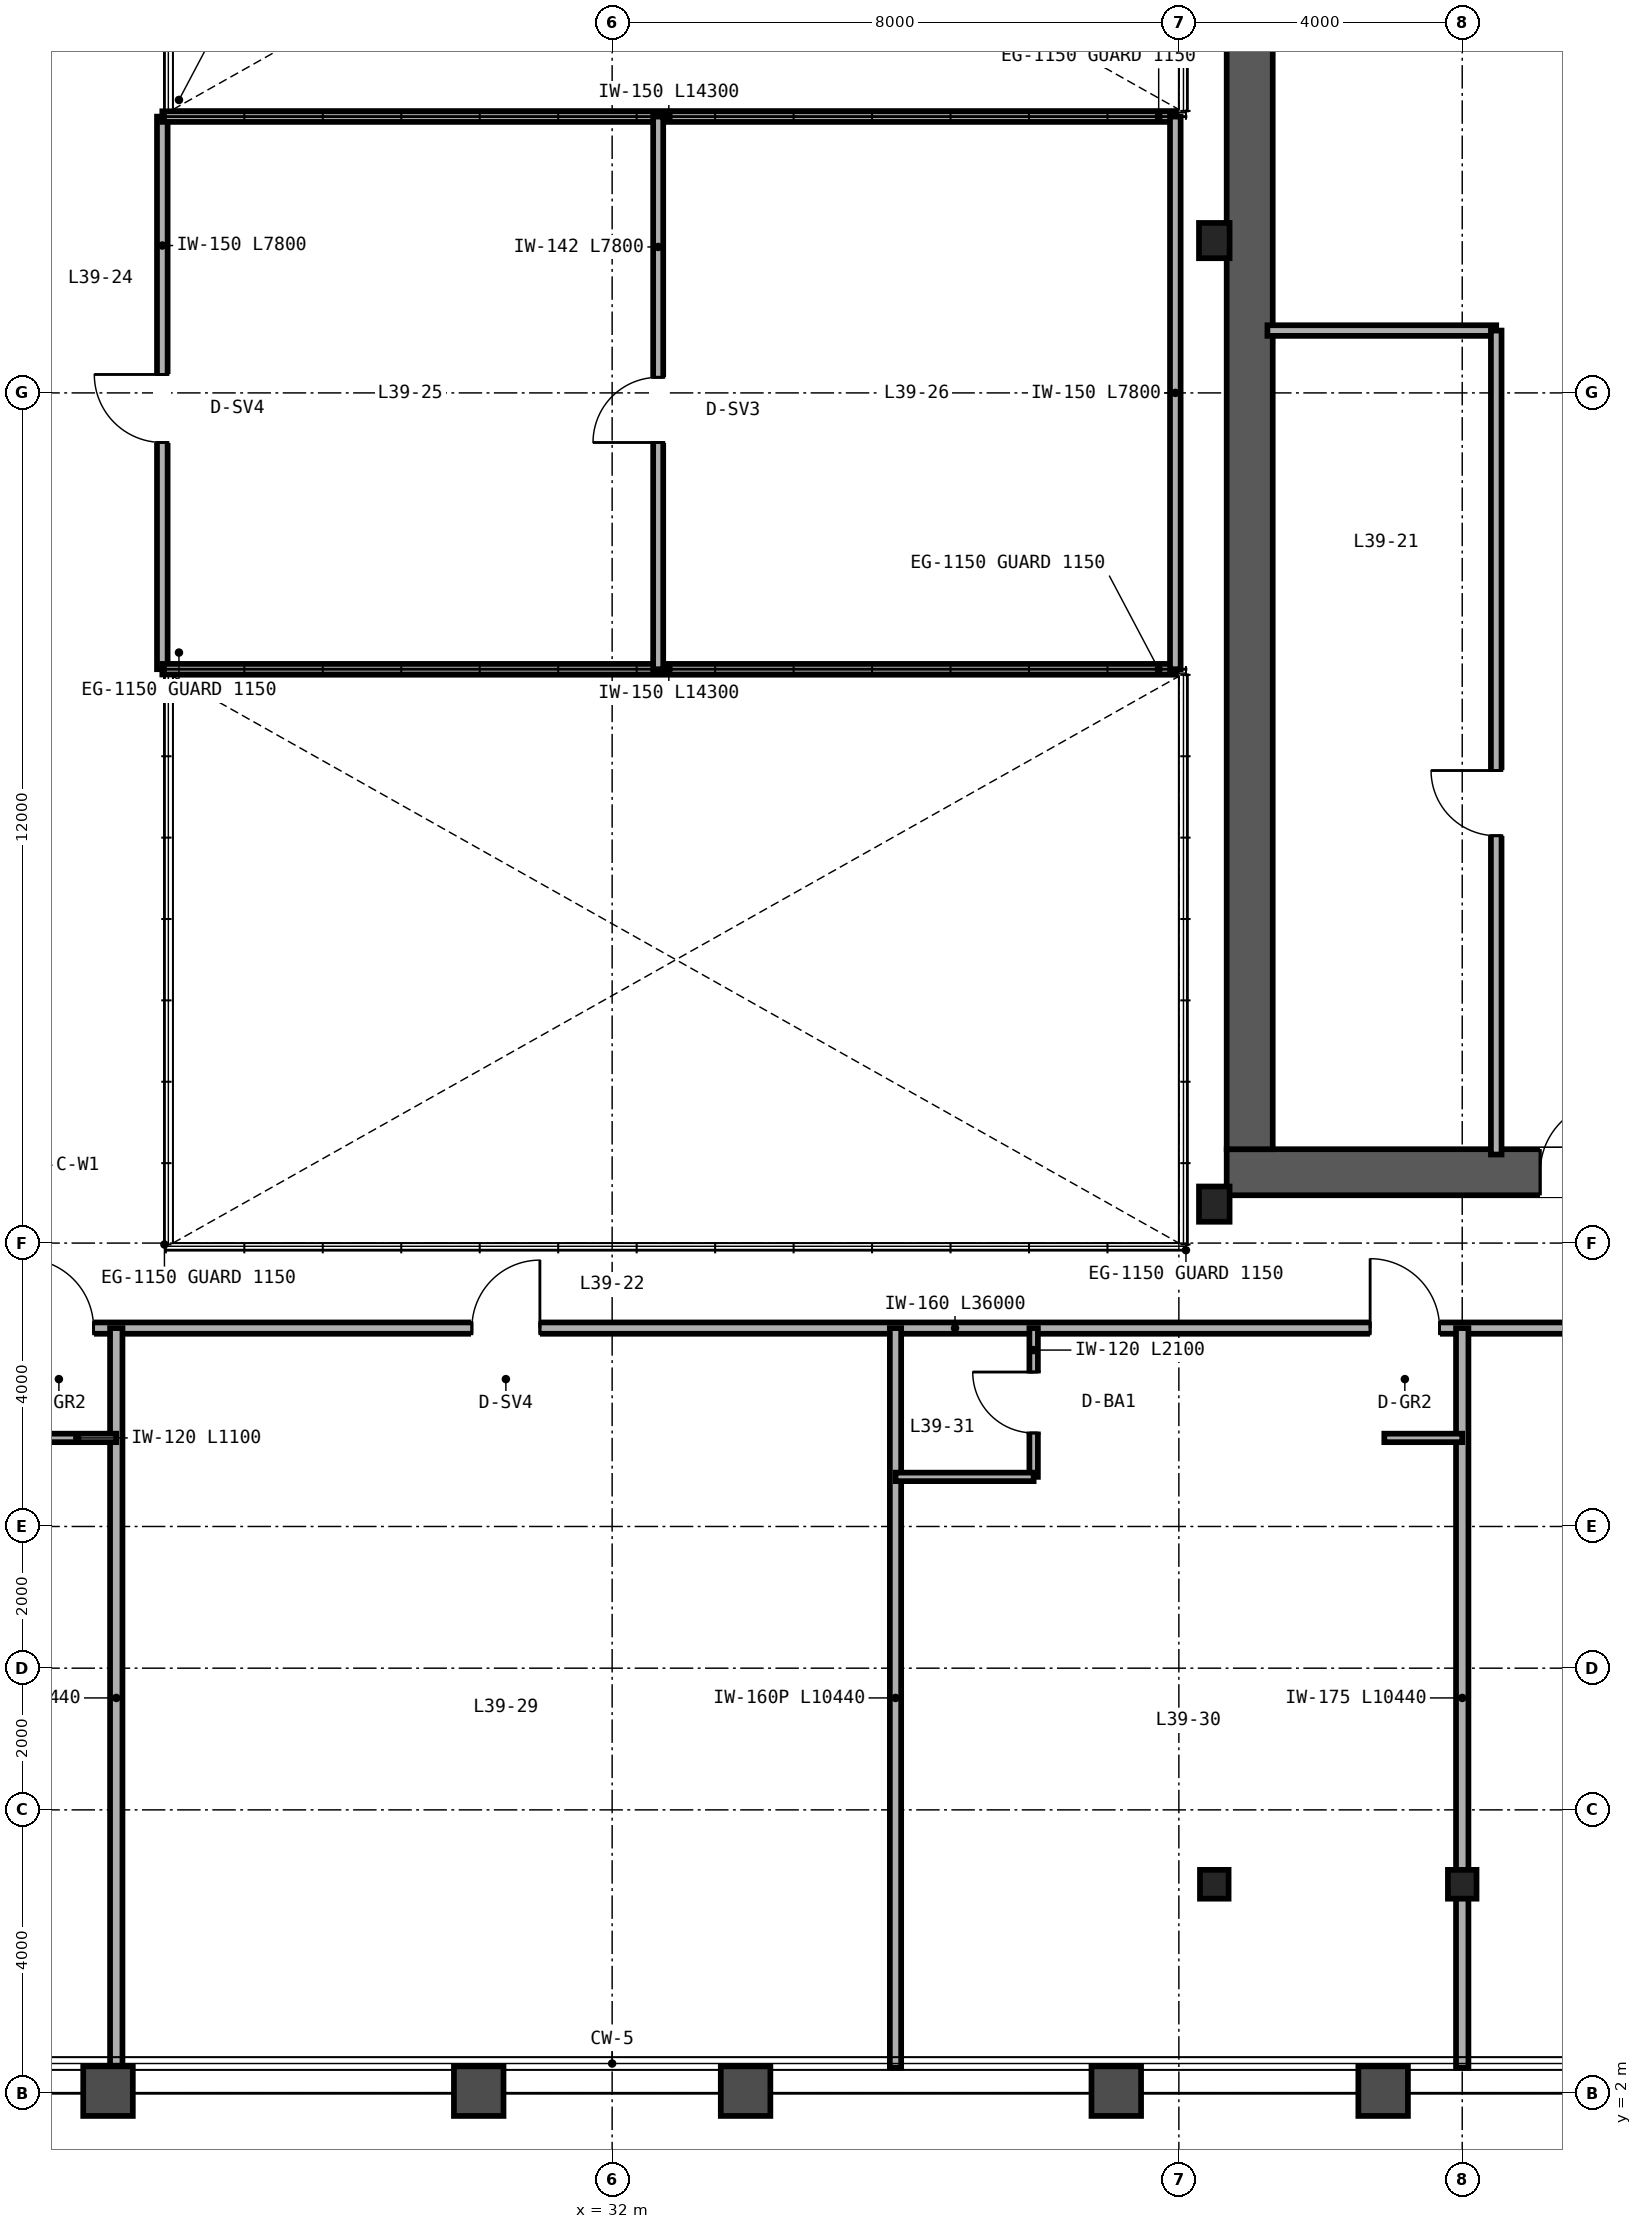
"""IFC4 building model, lengths in metres.
Left out: names, types, materials, properties, quantities, classifications, styles, units other than length and angle.
Written with IfcOpenShell. Run it as: python <this file> out.ifc"""

import sys

from ifc_helpers import new_model, si_unit, direction, frame, frame_2d, origin, origin_2d, place, context, subcontext, project, spatial, rectangle, i_section, extrude, source, transform, mapped, element, fill, save


model = new_model("IFC4")
c1 = context("Model", 3, precision=1e-05, world=origin(), true_north=direction((0.0, 1.0)))
c2 = subcontext(c1, "Body", "Model", "MODEL_VIEW")
j1 = project(units=[si_unit("LENGTHUNIT", "METRE"), si_unit("PLANEANGLEUNIT", "RADIAN")], contexts=[c1])
p1 = place(None, origin())
s1 = spatial("IfcSite", under=j1, at=p1, CompositionType="ELEMENT")
p2 = place(p1, origin())
s2 = spatial("IfcBuilding", under=s1, at=p2, CompositionType="ELEMENT")
p3 = place(p2, frame((0.0, 0.0, 158.4)))
s3 = spatial("IfcBuildingStorey", under=s2, at=p3, CompositionType="ELEMENT", Elevation=158.4)
p4 = place(p3, frame((40.675, 15.0, 0.0), z_axis=(0.0, 0.0, 1.0), x_axis=(1.0, 0.0, 0.0)))
e1 = element("IfcWall", 1, at=p4, inside=s3, PredefinedType="SHEAR", context=c2, shape_type="SweptSolid", body=[
    extrude(rectangle(XDim=12.65, YDim=0.65, at=frame_2d((6.325, 0.0))), origin(), (0.0, 0.0, 1.0), 4.57),
])
p5 = place(p4, frame((4.425, 0.0, 0.0)))
e2 = element("IfcOpeningElement", 2, at=p5, cuts=e1, PredefinedType="OPENING", context=c2, shape_type="SweptSolid", body=[
    extrude(rectangle(XDim=1.0, YDim=2.15, at=frame_2d((0.5, 1.075))), frame((0.0, 0.335, 0.0), z_axis=(0.0, -1.0, 0.0), x_axis=(1.0, 0.0, 0.0)), (0.0, 0.0, 1.0), 0.67),
])
p6 = place(p3, frame((41.0, 15.325, 0.0), z_axis=(0.0, 0.0, 1.0), x_axis=(0.0, 1.0, 0.0)))
e3 = element("IfcWall", 3, at=p6, inside=s3, PredefinedType="SHEAR", context=c2, shape_type="SweptSolid", body=[
    extrude(rectangle(XDim=21.35, YDim=0.65, at=frame_2d((10.675, 0.0))), origin(), (0.0, 0.0, 1.0), 4.57),
])
m1 = source(origin(), c2, "Body", "SweptSolid", [
    extrude(i_section(OverallWidth=0.432, OverallDepth=0.498, WebThickness=0.056, FlangeThickness=0.089, FilletRadius=0.025, at=origin_2d()), origin(), (0.0, 0.0, 1.0), 4.57),
])
for number, where, z_axis, x_axis in (
    (4, (40.5, 14.55, 0.0), (0.0, 0.0, 1.0), (1.0, 0.0, 0.0)),
    (5, (40.5, 28.15, 0.0), (0.0, 0.0, 1.0), (1.0, 0.0, 0.0)),
):
    element("IfcColumn", number, at=place(p3, frame(where, z_axis=z_axis, x_axis=x_axis)), inside=s3, PredefinedType="COLUMN", context=c2, shape_type="MappedRepresentation", body=[
        mapped(m1, transform((0.0, 0.0, 0.0), scale=1.0)),
    ])
m2 = source(origin(), c2, "Body", "SweptSolid", [
    extrude(i_section(OverallWidth=0.404, OverallDepth=0.407, WebThickness=0.027, FlangeThickness=0.044, FilletRadius=0.025, at=origin_2d()), origin(), (0.0, 0.0, 1.0), 4.989),
])
for number, where, z_axis, x_axis in (
    (6, (40.5, 4.95, 0.0), (0.0, 0.401, 0.916), (-1.0, 0.0, 0.0)),
    (7, (44.0, 4.95, 0.0), (0.0, 0.401, 0.916), (-1.0, 0.0, 0.0)),
):
    element("IfcColumn", number, at=place(p3, frame(where, z_axis=z_axis, x_axis=x_axis)), inside=s3, PredefinedType="COLUMN", context=c2, shape_type="MappedRepresentation", body=[
        mapped(m2, transform((0.0, 0.0, 0.0), scale=1.0)),
    ])
p7 = place(p3, frame((41.25, 26.88, 0.0), z_axis=(0.0, 0.0, 1.0), x_axis=(1.0, 0.0, 0.0)))
e8 = element("IfcWall", 8, at=p7, inside=s3, PredefinedType="PARTITIONING", context=c2, shape_type="SweptSolid", body=[
    extrude(rectangle(XDim=3.23, YDim=0.15, at=frame_2d((1.615, 0.0))), origin(), (0.0, 0.0, 1.0), 4.57),
])
p8 = place(p3, frame((44.48, 15.25, 0.0), z_axis=(0.0, 0.0, 1.0), x_axis=(0.0, 1.0, 0.0)))
e9 = element("IfcWall", 9, at=p8, inside=s3, PredefinedType="PARTITIONING", context=c2, shape_type="SweptSolid", body=[
    extrude(rectangle(XDim=11.63, YDim=0.15, at=frame_2d((5.815, 0.0))), origin(), (0.0, 0.0, 1.0), 4.57),
])
p9 = place(p8, frame((4.5, 0.0, 0.0)))
e10 = element("IfcOpeningElement", 10, at=p9, cuts=e9, PredefinedType="OPENING", context=c2, shape_type="SweptSolid", body=[
    extrude(rectangle(XDim=0.92, YDim=2.15, at=frame_2d((0.46, 1.075))), frame((0.0, 0.085, 0.0), z_axis=(0.0, -1.0, 0.0), x_axis=(1.0, 0.0, 0.0)), (0.0, 0.0, 1.0), 0.17),
])
p10 = place(p3, frame((25.65, 22.1, 0.0), z_axis=(0.0, 0.0, 1.0), x_axis=(0.0, 1.0, 0.0)))
e11 = element("IfcWall", 11, at=p10, inside=s3, PredefinedType="PARTITIONING", context=c2, shape_type="SweptSolid", body=[
    extrude(rectangle(XDim=7.8, YDim=0.15, at=frame_2d((3.9, 0.0))), origin(), (0.0, 0.0, 1.0), 3.643),
])
p11 = place(p10, frame((3.2, 0.0, 0.0)))
e12 = element("IfcOpeningElement", 12, at=p11, cuts=e11, PredefinedType="OPENING", context=c2, shape_type="SweptSolid", body=[
    extrude(rectangle(XDim=0.96, YDim=2.15, at=frame_2d((0.48, 1.075))), frame((0.0, 0.085, 0.0), z_axis=(0.0, -1.0, 0.0), x_axis=(1.0, 0.0, 0.0)), (0.0, 0.0, 1.0), 0.17),
])
for number, where, z_axis, x_axis in (
    (13, (25.65, 22.1, 0.0), (0.0, 0.0, 1.0), (1.0, 0.0, 0.0)),
    (14, (25.65, 29.9, 0.0), (0.0, 0.0, 1.0), (1.0, 0.0, 0.0)),
):
    element("IfcWall", number, at=place(p3, frame(where, z_axis=z_axis, x_axis=x_axis)), inside=s3, PredefinedType="PARTITIONING", context=c2, shape_type="SweptSolid", body=[
        extrude(rectangle(XDim=14.3, YDim=0.15, at=frame_2d((7.15, 0.0))), origin(), (0.0, 0.0, 1.0), 4.57),
    ])
p12 = place(p3, frame((39.95, 22.1, 0.0), z_axis=(0.0, 0.0, 1.0), x_axis=(0.0, 1.0, 0.0)))
e15 = element("IfcWall", 15, at=p12, inside=s3, PredefinedType="PARTITIONING", context=c2, shape_type="SweptSolid", body=[
    extrude(rectangle(XDim=7.8, YDim=0.15, at=frame_2d((3.9, 0.0))), origin(), (0.0, 0.0, 1.0), 3.643),
])
p13 = place(p3, frame((32.65, 22.1, 0.0), z_axis=(0.0, 0.0, 1.0), x_axis=(0.0, 1.0, 0.0)))
e16 = element("IfcWall", 16, at=p13, inside=s3, PredefinedType="PARTITIONING", context=c2, shape_type="SweptSolid", body=[
    extrude(rectangle(XDim=7.8, YDim=0.142, at=frame_2d((3.9, 0.0))), origin(), (0.0, 0.0, 1.0), 3.643),
])
p14 = place(p13, frame((3.2, 0.0, 0.0)))
e17 = element("IfcOpeningElement", 17, at=p14, cuts=e16, PredefinedType="OPENING", context=c2, shape_type="SweptSolid", body=[
    extrude(rectangle(XDim=0.92, YDim=2.15, at=frame_2d((0.46, 1.075))), frame((0.0, 0.081, 0.0), z_axis=(0.0, -1.0, 0.0), x_axis=(1.0, 0.0, 0.0)), (0.0, 0.0, 1.0), 0.162),
])
p15 = place(p3, frame((14.0, 12.8, 0.0), z_axis=(0.0, 0.0, 1.0), x_axis=(1.0, 0.0, 0.0)))
e18 = element("IfcWall", 18, at=p15, inside=s3, PredefinedType="PARTITIONING", context=c2, shape_type="SweptSolid", body=[
    extrude(rectangle(XDim=36.0, YDim=0.16, at=frame_2d((18.0, 0.0))), origin(), (0.0, 0.0, 1.0), 4.113),
])
p16 = place(p15, frame((9.7, 0.0, 0.0)))
e19 = element("IfcOpeningElement", 19, at=p16, cuts=e18, PredefinedType="OPENING", context=c2, shape_type="SweptSolid", body=[
    extrude(rectangle(XDim=0.98, YDim=2.2, at=frame_2d((0.49, 1.1))), frame((0.0, 0.09, 0.0), z_axis=(0.0, -1.0, 0.0), x_axis=(1.0, 0.0, 0.0)), (0.0, 0.0, 1.0), 0.18),
])
p17 = place(p15, frame((16.02, 0.0, 0.0)))
e20 = element("IfcOpeningElement", 20, at=p17, cuts=e18, PredefinedType="OPENING", context=c2, shape_type="SweptSolid", body=[
    extrude(rectangle(XDim=0.96, YDim=2.15, at=frame_2d((0.48, 1.075))), frame((0.0, 0.09, 0.0), z_axis=(0.0, -1.0, 0.0), x_axis=(1.0, 0.0, 0.0)), (0.0, 0.0, 1.0), 0.18),
])
p18 = place(p15, frame((28.7, 0.0, 0.0)))
e21 = element("IfcOpeningElement", 21, at=p18, cuts=e18, PredefinedType="OPENING", context=c2, shape_type="SweptSolid", body=[
    extrude(rectangle(XDim=0.98, YDim=2.2, at=frame_2d((0.49, 1.1))), frame((0.0, 0.09, 0.0), z_axis=(0.0, -1.0, 0.0), x_axis=(1.0, 0.0, 0.0)), (0.0, 0.0, 1.0), 0.18),
])
p19 = place(p15, frame((32.52, 0.0, 0.0)))
e22 = element("IfcOpeningElement", 22, at=p19, cuts=e18, PredefinedType="OPENING", context=c2, shape_type="SweptSolid", body=[
    extrude(rectangle(XDim=0.96, YDim=2.15, at=frame_2d((0.48, 1.075))), frame((0.0, 0.09, 0.0), z_axis=(0.0, -1.0, 0.0), x_axis=(1.0, 0.0, 0.0)), (0.0, 0.0, 1.0), 0.18),
])
p20 = place(p3, frame((25.0, 2.36, 0.0), z_axis=(0.0, 0.0, 1.0), x_axis=(0.0, 1.0, 0.0)))
e23 = element("IfcWall", 23, at=p20, inside=s3, PredefinedType="PARTITIONING", context=c2, shape_type="SweptSolid", body=[
    extrude(rectangle(XDim=10.44, YDim=0.175, at=frame_2d((5.22, 0.0))), origin(), (0.0, 0.0, 1.0), 3.643),
])
p21 = place(p3, frame((23.9, 11.25, 0.0), z_axis=(0.0, 0.0, 1.0), x_axis=(1.0, 0.0, 0.0)))
e24 = element("IfcWall", 24, at=p21, inside=s3, PredefinedType="PARTITIONING", context=c2, shape_type="SweptSolid", body=[
    extrude(rectangle(XDim=1.1, YDim=0.12, at=frame_2d((0.55, 0.0))), origin(), (0.0, 0.0, 1.0), 4.57),
])
p22 = place(p3, frame((36.0, 2.36, 0.0), z_axis=(0.0, 0.0, 1.0), x_axis=(0.0, 1.0, 0.0)))
e25 = element("IfcWall", 25, at=p22, inside=s3, PredefinedType="PARTITIONING", context=c2, shape_type="SweptSolid", body=[
    extrude(rectangle(XDim=10.44, YDim=0.16, at=frame_2d((5.22, 0.0))), origin(), (0.0, 0.0, 1.0), 3.643),
])
p23 = place(p3, frame((44.0, 2.36, 0.0), z_axis=(0.0, 0.0, 1.0), x_axis=(0.0, 1.0, 0.0)))
e26 = element("IfcWall", 26, at=p23, inside=s3, PredefinedType="PARTITIONING", context=c2, shape_type="SweptSolid", body=[
    extrude(rectangle(XDim=10.44, YDim=0.175, at=frame_2d((5.22, 0.0))), origin(), (0.0, 0.0, 1.0), 3.877),
])
p24 = place(p3, frame((37.95, 10.7, 0.0), z_axis=(0.0, 0.0, 1.0), x_axis=(0.0, 1.0, 0.0)))
e27 = element("IfcWall", 27, at=p24, inside=s3, PredefinedType="PARTITIONING", context=c2, shape_type="SweptSolid", body=[
    extrude(rectangle(XDim=2.1, YDim=0.12, at=frame_2d((1.05, 0.0))), origin(), (0.0, 0.0, 1.0), 4.57),
])
p25 = place(p24, frame((0.62, 0.0, 0.0)))
e28 = element("IfcOpeningElement", 28, at=p25, cuts=e27, PredefinedType="OPENING", context=c2, shape_type="SweptSolid", body=[
    extrude(rectangle(XDim=0.86, YDim=2.1, at=frame_2d((0.43, 1.05))), frame((0.0, 0.07, 0.0), z_axis=(0.0, -1.0, 0.0), x_axis=(1.0, 0.0, 0.0)), (0.0, 0.0, 1.0), 0.14),
])
p26 = place(p3, frame((36.0, 10.7, 0.0), z_axis=(0.0, 0.0, 1.0), x_axis=(1.0, 0.0, 0.0)))
e29 = element("IfcWall", 29, at=p26, inside=s3, PredefinedType="PARTITIONING", context=c2, shape_type="SweptSolid", body=[
    extrude(rectangle(XDim=1.95, YDim=0.12, at=frame_2d((0.975, 0.0))), origin(), (0.0, 0.0, 1.0), 4.57),
])
p27 = place(p3, frame((42.9, 11.25, 0.0), z_axis=(0.0, 0.0, 1.0), x_axis=(1.0, 0.0, 0.0)))
e30 = element("IfcWall", 30, at=p27, inside=s3, PredefinedType="PARTITIONING", context=c2, shape_type="SweptSolid", body=[
    extrude(rectangle(XDim=1.1, YDim=0.12, at=frame_2d((0.55, 0.0))), origin(), (0.0, 0.0, 1.0), 4.57),
])
m3 = source(origin(), c2, "Body", "SweptSolid", [
    extrude(rectangle(XDim=1.0, YDim=2.15, at=frame_2d((0.5, 1.075))), frame((0.0, 0.025, 0.0), z_axis=(0.0, -1.0, 0.0), x_axis=(1.0, 0.0, 0.0)), (0.0, 0.0, 1.0), 0.05),
])
p28 = place(p5, origin())
e31 = element("IfcDoor", 31, at=p28, inside=s3, OperationType="SINGLE_SWING_RIGHT", PredefinedType="DOOR", context=c2, shape_type="MappedRepresentation", body=[
    mapped(m3, transform((0.0, 0.0, 0.0), scale=1.0)),
])
fill(e2, e31)
m4 = source(origin(), c2, "Body", "SweptSolid", [
    extrude(rectangle(XDim=0.92, YDim=2.15, at=frame_2d((0.46, 1.075))), frame((0.0, 0.025, 0.0), z_axis=(0.0, -1.0, 0.0), x_axis=(1.0, 0.0, 0.0)), (0.0, 0.0, 1.0), 0.05),
])
p29 = place(p9, origin())
e32 = element("IfcDoor", 32, at=p29, inside=s3, OperationType="SINGLE_SWING_RIGHT", PredefinedType="DOOR", context=c2, shape_type="MappedRepresentation", body=[
    mapped(m4, transform((0.0, 0.0, 0.0), scale=1.0)),
])
fill(e10, e32)
m5 = source(origin(), c2, "Body", "SweptSolid", [
    extrude(rectangle(XDim=0.96, YDim=2.15, at=frame_2d((0.48, 1.075))), frame((0.0, 0.025, 0.0), z_axis=(0.0, -1.0, 0.0), x_axis=(1.0, 0.0, 0.0)), (0.0, 0.0, 1.0), 0.05),
])
p30 = place(p11, origin())
e33 = element("IfcDoor", 33, at=p30, inside=s3, OperationType="SINGLE_SWING_RIGHT", PredefinedType="DOOR", context=c2, shape_type="MappedRepresentation", body=[
    mapped(m5, transform((0.0, 0.0, 0.0), scale=1.0)),
])
fill(e12, e33)
p31 = place(p14, origin())
e34 = element("IfcDoor", 34, at=p31, inside=s3, OperationType="SINGLE_SWING_LEFT", PredefinedType="DOOR", context=c2, shape_type="MappedRepresentation", body=[
    mapped(m4, transform((0.0, 0.0, 0.0), scale=1.0)),
])
fill(e17, e34)
m6 = source(origin(), c2, "Body", "SweptSolid", [
    extrude(rectangle(XDim=0.86, YDim=2.1, at=frame_2d((0.43, 1.05))), frame((0.0, 0.025, 0.0), z_axis=(0.0, -1.0, 0.0), x_axis=(1.0, 0.0, 0.0)), (0.0, 0.0, 1.0), 0.05),
])
p32 = place(p25, origin())
e35 = element("IfcDoor", 35, at=p32, inside=s3, OperationType="SINGLE_SWING_RIGHT", PredefinedType="DOOR", context=c2, shape_type="MappedRepresentation", body=[
    mapped(m6, transform((0.0, 0.0, 0.0), scale=1.0)),
])
fill(e28, e35)
m7 = source(origin(), c2, "Body", "SweptSolid", [
    extrude(rectangle(XDim=0.98, YDim=2.2, at=frame_2d((0.49, 1.1))), frame((0.0, 0.025, 0.0), z_axis=(0.0, -1.0, 0.0), x_axis=(1.0, 0.0, 0.0)), (0.0, 0.0, 1.0), 0.05),
])
p33 = place(p16, origin())
e36 = element("IfcDoor", 36, at=p33, inside=s3, OperationType="SINGLE_SWING_LEFT", PredefinedType="DOOR", context=c2, shape_type="MappedRepresentation", body=[
    mapped(m7, transform((0.0, 0.0, 0.0), scale=1.0)),
])
fill(e19, e36)
p34 = place(p17, origin())
e37 = element("IfcDoor", 37, at=p34, inside=s3, OperationType="SINGLE_SWING_RIGHT", PredefinedType="DOOR", context=c2, shape_type="MappedRepresentation", body=[
    mapped(m5, transform((0.0, 0.0, 0.0), scale=1.0)),
])
fill(e20, e37)
p35 = place(p18, origin())
e38 = element("IfcDoor", 38, at=p35, inside=s3, OperationType="SINGLE_SWING_LEFT", PredefinedType="DOOR", context=c2, shape_type="MappedRepresentation", body=[
    mapped(m7, transform((0.0, 0.0, 0.0), scale=1.0)),
])
fill(e21, e38)
save(model, sys.argv[1])
